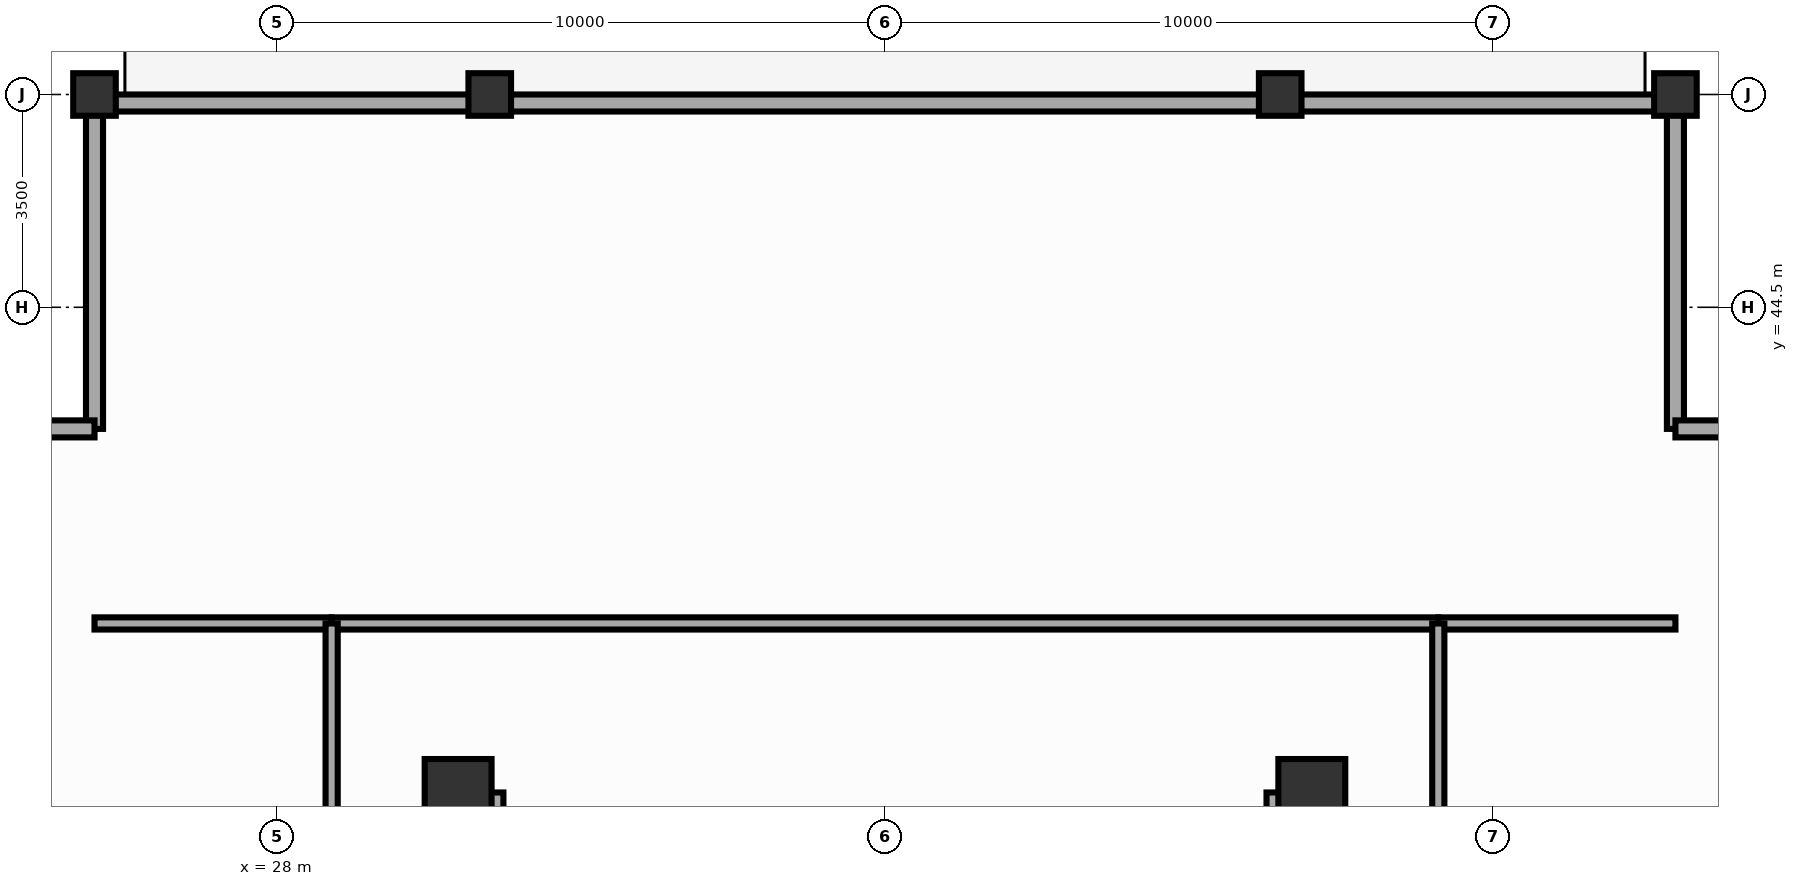
"""IFC4 building model, lengths in metres.
Left out: names, types, materials, properties, quantities, classifications, styles, units other than length and angle.
Written with IfcOpenShell. Run it as: python <this file> out.ifc"""

import sys

from ifc_helpers import new_model, si_unit, direction, frame, frame_2d, origin, origin_2d, place, context, subcontext, project, spatial, rectangle, extrude, source, transform, mapped, element, fill, save


model = new_model("IFC4")
c1 = context("Model", 3, precision=1e-05, world=origin(), true_north=direction((0.0, 1.0)))
c2 = subcontext(c1, "Body", "Model", "MODEL_VIEW")
j1 = project(units=[si_unit("LENGTHUNIT", "METRE"), si_unit("PLANEANGLEUNIT", "RADIAN")], contexts=[c1])
p1 = place(None, origin())
s1 = spatial("IfcSite", under=j1, at=p1, CompositionType="ELEMENT")
p2 = place(p1, origin())
s2 = spatial("IfcBuilding", under=s1, at=p2, CompositionType="ELEMENT")
p3 = place(p2, frame((0.0, 0.0, 206.5)))
s3 = spatial("IfcBuildingStorey", under=s2, at=p3, CompositionType="ELEMENT", Elevation=206.5)
p4 = place(p3, frame((31.5, 17.48, 0.0), z_axis=(0.0, 0.0, 1.0), x_axis=(0.0, 1.0, 0.0)))
e1 = element("IfcWall", 1, at=p4, inside=s3, PredefinedType="SHEAR", context=c2, shape_type="SweptSolid", body=[
    extrude(rectangle(XDim=19.04, YDim=0.45, at=frame_2d((9.52, 0.0))), origin(), (0.0, 0.0, 1.0), 3.8),
])
p5 = place(p4, frame((6.32, 0.0, 0.0)))
e2 = element("IfcOpeningElement", 2, at=p5, cuts=e1, PredefinedType="OPENING", context=c2, shape_type="SweptSolid", body=[
    extrude(rectangle(XDim=1.1, YDim=2.15, at=frame_2d((0.55, 1.075))), frame((0.0, 0.237, 0.0), z_axis=(0.0, -1.0, 0.0), x_axis=(1.0, 0.0, 0.0)), (0.0, 0.0, 1.0), 0.474),
])
p6 = place(p3, frame((44.5, 17.48, 0.0), z_axis=(0.0, 0.0, 1.0), x_axis=(0.0, 1.0, 0.0)))
e3 = element("IfcWall", 3, at=p6, inside=s3, PredefinedType="SHEAR", context=c2, shape_type="SweptSolid", body=[
    extrude(rectangle(XDim=19.04, YDim=0.45, at=frame_2d((9.52, 0.0))), origin(), (0.0, 0.0, 1.0), 3.8),
])
p7 = place(p6, frame((12.67, 0.0, 0.0), z_axis=(0.0, 0.0, 1.0), x_axis=(-1.0, 0.0, 0.0)))
e4 = element("IfcOpeningElement", 4, at=p7, cuts=e3, PredefinedType="OPENING", context=c2, shape_type="SweptSolid", body=[
    extrude(rectangle(XDim=1.1, YDim=2.15, at=frame_2d((0.55, 1.075))), frame((0.0, 0.237, 0.0), z_axis=(0.0, -1.0, 0.0), x_axis=(1.0, 0.0, 0.0)), (0.0, 0.0, 1.0), 0.474),
])
m1 = source(origin(), c2, "Body", "SweptSolid", [
    extrude(rectangle(XDim=1.1, YDim=1.1, at=origin_2d()), origin(), (0.0, 0.0, 1.0), 3.8),
])
for number, where, z_axis, x_axis in (
    (5, (30.98, 36.52, 0.0), (0.0, 0.0, 1.0), (1.0, 0.0, 0.0)),
    (6, (45.02, 36.52, 0.0), (0.0, 0.0, 1.0), (1.0, 0.0, 0.0)),
):
    element("IfcColumn", number, at=place(p3, frame(where, z_axis=z_axis, x_axis=x_axis)), inside=s3, PredefinedType="COLUMN", context=c2, shape_type="MappedRepresentation", body=[
        mapped(m1, transform((0.0, 0.0, 0.0), scale=1.0)),
    ])
m2 = source(origin(), c2, "Body", "SweptSolid", [
    extrude(rectangle(XDim=0.7, YDim=0.7, at=origin_2d()), origin(), (0.0, 0.0, 1.0), 3.8),
])
for number, where, z_axis, x_axis in (
    (7, (51.0, 48.0, 0.0), (0.0, 0.0, 1.0), (1.0, 0.0, 0.0)),
    (8, (44.5, 48.0, 0.0), (0.0, 0.0, 1.0), (1.0, 0.0, 0.0)),
    (9, (31.5, 48.0, 0.0), (0.0, 0.0, 1.0), (1.0, 0.0, 0.0)),
    (10, (25.0, 48.0, 0.0), (0.0, 0.0, 1.0), (1.0, 0.0, 0.0)),
):
    element("IfcColumn", number, at=place(p3, frame(where, z_axis=z_axis, x_axis=x_axis)), inside=s3, PredefinedType="COLUMN", context=c2, shape_type="MappedRepresentation", body=[
        mapped(m2, transform((0.0, 0.0, 0.0), scale=1.0)),
    ])
p8 = place(p3, frame((25.0, 47.86, 0.0), z_axis=(0.0, 0.0, 1.0), x_axis=(1.0, 0.0, 0.0)))
e11 = element("IfcWall", 11, at=p8, inside=s3, PredefinedType="SOLIDWALL", context=c2, shape_type="SweptSolid", body=[
    extrude(rectangle(XDim=26.0, YDim=0.28, at=frame_2d((13.0, 0.0))), origin(), (0.0, 0.0, 1.0), 2.34),
])
for number, where, z_axis, x_axis in (
    (12, (25.0, 42.5, 0.0), (0.0, 0.0, 1.0), (0.0, 1.0, 0.0)),
    (13, (19.5, 42.5, 0.0), (0.0, 0.0, 1.0), (1.0, 0.0, 0.0)),
    (14, (51.0, 42.5, 0.0), (0.0, 0.0, 1.0), (0.0, 1.0, 0.0)),
    (15, (51.0, 42.5, 0.0), (0.0, 0.0, 1.0), (1.0, 0.0, 0.0)),
):
    element("IfcWall", number, at=place(p3, frame(where, z_axis=z_axis, x_axis=x_axis)), inside=s3, PredefinedType="SOLIDWALL", context=c2, shape_type="SweptSolid", body=[
        extrude(rectangle(XDim=5.5, YDim=0.28, at=frame_2d((2.75, 0.0))), origin(), (0.0, 0.0, 1.0), 2.34),
    ])
p9 = place(p3, frame((25.0, 39.3, 0.0), z_axis=(0.0, 0.0, 1.0), x_axis=(1.0, 0.0, 0.0)))
e16 = element("IfcWall", 16, at=p9, inside=s3, PredefinedType="PARTITIONING", context=c2, shape_type="SweptSolid", body=[
    extrude(rectangle(XDim=3.9, YDim=0.2, at=frame_2d((1.95, 0.0))), origin(), (0.0, 0.0, 1.0), 3.59),
])
p10 = place(p3, frame((28.9, 39.3, 0.0), z_axis=(0.0, 0.0, 1.0), x_axis=(1.0, 0.0, 0.0)))
e17 = element("IfcWall", 17, at=p10, inside=s3, PredefinedType="PARTITIONING", context=c2, shape_type="SweptSolid", body=[
    extrude(rectangle(XDim=18.2, YDim=0.2, at=frame_2d((9.1, 0.0))), origin(), (0.0, 0.0, 1.0), 3.59),
])
p11 = place(p10, frame((8.55, 0.0, 0.0)))
e18 = element("IfcOpeningElement", 18, at=p11, cuts=e17, PredefinedType="OPENING", context=c2, shape_type="SweptSolid", body=[
    extrude(rectangle(XDim=1.1, YDim=2.15, at=frame_2d((0.55, 1.075))), frame((0.0, 0.112, 0.0), z_axis=(0.0, -1.0, 0.0), x_axis=(1.0, 0.0, 0.0)), (0.0, 0.0, 1.0), 0.224),
])
p12 = place(p3, frame((47.1, 39.3, 0.0), z_axis=(0.0, 0.0, 1.0), x_axis=(1.0, 0.0, 0.0)))
e19 = element("IfcWall", 19, at=p12, inside=s3, PredefinedType="PARTITIONING", context=c2, shape_type="SweptSolid", body=[
    extrude(rectangle(XDim=3.9, YDim=0.2, at=frame_2d((1.95, 0.0))), origin(), (0.0, 0.0, 1.0), 3.59),
])
p13 = place(p3, frame((28.9, 14.5, 0.0), z_axis=(0.0, 0.0, 1.0), x_axis=(0.0, 1.0, 0.0)))
e20 = element("IfcWall", 20, at=p13, inside=s3, PredefinedType="PARTITIONING", context=c2, shape_type="SweptSolid", body=[
    extrude(rectangle(XDim=24.8, YDim=0.2, at=frame_2d((12.4, 0.0))), origin(), (0.0, 0.0, 1.0), 3.59),
])
p14 = place(p13, frame((11.85, 0.0, 0.0)))
e21 = element("IfcOpeningElement", 21, at=p14, cuts=e20, PredefinedType="OPENING", context=c2, shape_type="SweptSolid", body=[
    extrude(rectangle(XDim=1.1, YDim=2.15, at=frame_2d((0.55, 1.075))), frame((0.0, 0.112, 0.0), z_axis=(0.0, -1.0, 0.0), x_axis=(1.0, 0.0, 0.0)), (0.0, 0.0, 1.0), 0.224),
])
p15 = place(p3, frame((47.1, 14.5, 0.0), z_axis=(0.0, 0.0, 1.0), x_axis=(0.0, 1.0, 0.0)))
e22 = element("IfcWall", 22, at=p15, inside=s3, PredefinedType="PARTITIONING", context=c2, shape_type="SweptSolid", body=[
    extrude(rectangle(XDim=24.8, YDim=0.2, at=frame_2d((12.4, 0.0))), origin(), (0.0, 0.0, 1.0), 3.59),
])
p16 = place(p15, frame((11.85, 0.0, 0.0)))
e23 = element("IfcOpeningElement", 23, at=p16, cuts=e22, PredefinedType="OPENING", context=c2, shape_type="SweptSolid", body=[
    extrude(rectangle(XDim=1.1, YDim=2.15, at=frame_2d((0.55, 1.075))), frame((0.0, 0.112, 0.0), z_axis=(0.0, -1.0, 0.0), x_axis=(1.0, 0.0, 0.0)), (0.0, 0.0, 1.0), 0.224),
])
m3 = source(origin(), c2, "Body", "SweptSolid", [
    extrude(rectangle(XDim=1.1, YDim=2.15, at=frame_2d((0.55, 1.075))), frame((0.0, 0.025, 0.0), z_axis=(0.0, -1.0, 0.0), x_axis=(1.0, 0.0, 0.0)), (0.0, 0.0, 1.0), 0.05),
])
p17 = place(p11, origin())
e24 = element("IfcDoor", 24, at=p17, inside=s3, OperationType="SINGLE_SWING_LEFT", PredefinedType="DOOR", context=c2, shape_type="MappedRepresentation", body=[
    mapped(m3, transform((0.0, 0.0, 0.0), scale=1.0)),
])
fill(e18, e24)
save(model, sys.argv[1])
